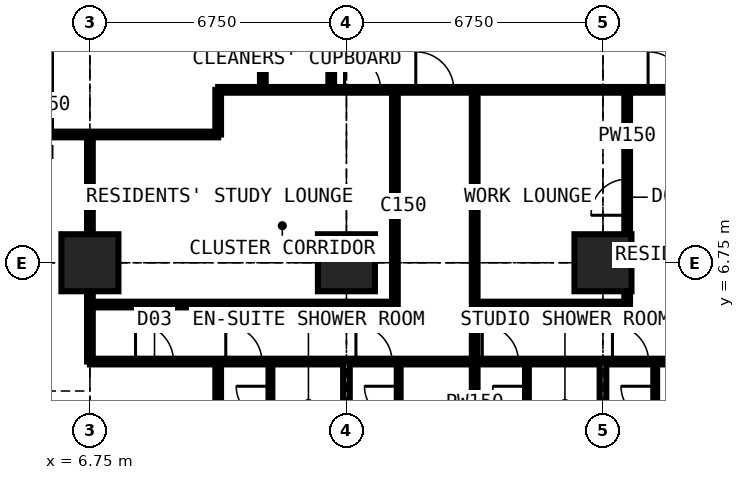
"""IFC4 building model, lengths in metres.
Left out: names, types, materials, properties, quantities, classifications, styles, units other than length and angle.
Written with IfcOpenShell. Run it as: python <this file> out.ifc"""

import sys

from ifc_helpers import new_model, si_unit, direction, frame, frame_2d, origin, origin_2d, place, context, subcontext, project, spatial, rectangle, extrude, element, fill, save


model = new_model("IFC4")
c1 = context("Model", 3, precision=1e-05, world=origin(), true_north=direction((0.0, 1.0)))
c2 = subcontext(c1, "Body", "Model", "MODEL_VIEW")
j1 = project(units=[si_unit("LENGTHUNIT", "METRE"), si_unit("PLANEANGLEUNIT", "RADIAN")], contexts=[c1])
p1 = place(None, origin())
s1 = spatial("IfcSite", under=j1, at=p1, CompositionType="ELEMENT")
p2 = place(p1, origin())
s2 = spatial("IfcBuilding", under=s1, at=p2, CompositionType="ELEMENT")
p3 = place(p2, frame((0.0, 0.0, 160.2)))
s3 = spatial("IfcBuildingStorey", under=s2, at=p3, CompositionType="ELEMENT", Elevation=160.2)
for number, where, z_axis, x_axis in (
    (1, (6.75, 6.75, 0.0), (0.0, 0.0, 1.0), (1.0, 0.0, 0.0)),
    (2, (13.5, 6.75, 0.0), (0.0, 0.0, 1.0), (1.0, 0.0, 0.0)),
    (3, (20.25, 6.75, 0.0), (0.0, 0.0, 1.0), (1.0, 0.0, 0.0)),
):
    element("IfcColumn", number, at=place(p3, frame(where, z_axis=z_axis, x_axis=x_axis)), inside=s3, PredefinedType="COLUMN", context=c2, shape_type="SweptSolid", body=[
        extrude(rectangle(XDim=1.5, YDim=1.5, at=origin_2d()), origin(), (0.0, 0.0, 1.0), 3.6),
    ])
p4 = place(p3, frame((-0.734, 10.125, 0.0), z_axis=(0.0, 0.0, 1.0), x_axis=(1.0, 0.0, 0.0)))
e4 = element("IfcWall", 4, at=p4, inside=s3, PredefinedType="PARTITIONING", context=c2, shape_type="SweptSolid", body=[
    extrude(rectangle(XDim=10.859, YDim=0.15, at=frame_2d((5.429, 0.0))), origin(), (0.0, 0.0, 1.0), 3.375),
])
p5 = place(p3, frame((6.75, 4.15, 0.0), z_axis=(0.0, 0.0, 1.0), x_axis=(0.0, 1.0, 0.0)))
e5 = element("IfcWall", 5, at=p5, inside=s3, PredefinedType="PARTITIONING", context=c2, shape_type="SweptSolid", body=[
    extrude(rectangle(XDim=5.975, YDim=0.15, at=frame_2d((2.988, 0.0))), origin(), (0.0, 0.0, 1.0), 2.877),
])
p6 = place(p3, frame((6.75, 4.15, 0.0), z_axis=(0.0, 0.0, 1.0), x_axis=(1.0, 0.0, 0.0)))
e6 = element("IfcWall", 6, at=p6, inside=s3, PredefinedType="PARTITIONING", context=c2, shape_type="SweptSolid", body=[
    extrude(rectangle(XDim=20.25, YDim=0.15, at=frame_2d((10.125, 0.0))), origin(), (0.0, 0.0, 1.0), 3.375),
])
p7 = place(p6, frame((1.2, 0.0, 0.0)))
e7 = element("IfcOpeningElement", 7, at=p7, cuts=e6, PredefinedType="OPENING", context=c2, shape_type="SweptSolid", body=[
    extrude(rectangle(XDim=1.0, YDim=2.2, at=frame_2d((0.5, 1.1))), frame((0.0, 0.085, 0.0), z_axis=(0.0, -1.0, 0.0), x_axis=(1.0, 0.0, 0.0)), (0.0, 0.0, 1.0), 0.17),
])
p8 = place(p6, frame((3.575, 0.0, 0.0)))
e8 = element("IfcOpeningElement", 8, at=p8, cuts=e6, PredefinedType="OPENING", context=c2, shape_type="SweptSolid", body=[
    extrude(rectangle(XDim=0.95, YDim=2.2, at=frame_2d((0.475, 1.1))), frame((0.0, 0.085, 0.0), z_axis=(0.0, -1.0, 0.0), x_axis=(1.0, 0.0, 0.0)), (0.0, 0.0, 1.0), 0.17),
])
p9 = place(p6, frame((7.0, 0.0, 0.0)))
e9 = element("IfcOpeningElement", 9, at=p9, cuts=e6, PredefinedType="OPENING", context=c2, shape_type="SweptSolid", body=[
    extrude(rectangle(XDim=0.95, YDim=2.2, at=frame_2d((0.475, 1.1))), frame((0.0, 0.085, 0.0), z_axis=(0.0, -1.0, 0.0), x_axis=(1.0, 0.0, 0.0)), (0.0, 0.0, 1.0), 0.17),
])
p10 = place(p6, frame((10.325, 0.0, 0.0)))
e10 = element("IfcOpeningElement", 10, at=p10, cuts=e6, PredefinedType="OPENING", context=c2, shape_type="SweptSolid", body=[
    extrude(rectangle(XDim=0.95, YDim=2.2, at=frame_2d((0.475, 1.1))), frame((0.0, 0.085, 0.0), z_axis=(0.0, -1.0, 0.0), x_axis=(1.0, 0.0, 0.0)), (0.0, 0.0, 1.0), 0.17),
])
p11 = place(p6, frame((13.75, 0.0, 0.0)))
e11 = element("IfcOpeningElement", 11, at=p11, cuts=e6, PredefinedType="OPENING", context=c2, shape_type="SweptSolid", body=[
    extrude(rectangle(XDim=0.95, YDim=2.2, at=frame_2d((0.475, 1.1))), frame((0.0, 0.085, 0.0), z_axis=(0.0, -1.0, 0.0), x_axis=(1.0, 0.0, 0.0)), (0.0, 0.0, 1.0), 0.17),
])
p12 = place(p6, frame((17.125, 0.0, 0.0)))
e12 = element("IfcOpeningElement", 12, at=p12, cuts=e6, PredefinedType="OPENING", context=c2, shape_type="SweptSolid", body=[
    extrude(rectangle(XDim=0.95, YDim=2.2, at=frame_2d((0.475, 1.1))), frame((0.0, 0.085, 0.0), z_axis=(0.0, -1.0, 0.0), x_axis=(1.0, 0.0, 0.0)), (0.0, 0.0, 1.0), 0.17),
])
p13 = place(p3, frame((6.75, 5.65, 0.0), z_axis=(0.0, 0.0, 1.0), x_axis=(1.0, 0.0, 0.0)))
e13 = element("IfcWall", 13, at=p13, inside=s3, PredefinedType="PARTITIONING", context=c2, shape_type="SweptSolid", body=[
    extrude(rectangle(XDim=8.025, YDim=0.15, at=frame_2d((4.012, 0.0))), origin(), (0.0, 0.0, 1.0), 3.375),
])
p14 = place(p3, frame((10.125, -0.734, 0.0), z_axis=(0.0, 0.0, 1.0), x_axis=(0.0, 1.0, 0.0)))
e14 = element("IfcWall", 14, at=p14, inside=s3, PredefinedType="PARTITIONING", context=c2, shape_type="SweptSolid", body=[
    extrude(rectangle(XDim=4.884, YDim=0.15, at=frame_2d((2.442, 0.0))), origin(), (0.0, 0.0, 1.0), 3.375),
])
p15 = place(p3, frame((10.125, 10.125, 0.0), z_axis=(0.0, 0.0, 1.0), x_axis=(0.0, 1.0, 0.0)))
e15 = element("IfcWall", 15, at=p15, inside=s3, PredefinedType="PARTITIONING", context=c2, shape_type="SweptSolid", body=[
    extrude(rectangle(XDim=1.175, YDim=0.15, at=frame_2d((0.587, 0.0))), origin(), (0.0, 0.0, 1.0), 3.375),
])
p16 = place(p3, frame((10.125, 11.3, 0.0), z_axis=(0.0, 0.0, 1.0), x_axis=(1.0, 0.0, 0.0)))
e16 = element("IfcWall", 16, at=p16, inside=s3, PredefinedType="PARTITIONING", context=c2, shape_type="SweptSolid", body=[
    extrude(rectangle(XDim=20.25, YDim=0.15, at=frame_2d((10.125, 0.0))), origin(), (0.0, 0.0, 1.0), 3.375),
])
p17 = place(p16, frame((5.2, 0.0, 0.0)))
e17 = element("IfcOpeningElement", 17, at=p17, cuts=e16, PredefinedType="OPENING", context=c2, shape_type="SweptSolid", body=[
    extrude(rectangle(XDim=1.0, YDim=2.2, at=frame_2d((0.5, 1.1))), frame((0.0, 0.085, 0.0), z_axis=(0.0, -1.0, 0.0), x_axis=(1.0, 0.0, 0.0)), (0.0, 0.0, 1.0), 0.17),
])
p18 = place(p16, frame((11.312, 0.0, 0.0)))
e18 = element("IfcOpeningElement", 18, at=p18, cuts=e16, PredefinedType="OPENING", context=c2, shape_type="SweptSolid", body=[
    extrude(rectangle(XDim=1.0, YDim=2.2, at=frame_2d((0.5, 1.1))), frame((0.0, 0.085, 0.0), z_axis=(0.0, -1.0, 0.0), x_axis=(1.0, 0.0, 0.0)), (0.0, 0.0, 1.0), 0.17),
])
p19 = place(p16, frame((3.325, 0.0, 0.0)))
e19 = element("IfcOpeningElement", 19, at=p19, cuts=e16, PredefinedType="OPENING", context=c2, shape_type="SweptSolid", body=[
    extrude(rectangle(XDim=0.95, YDim=2.2, at=frame_2d((0.475, 1.1))), frame((0.0, 0.085, 0.0), z_axis=(0.0, -1.0, 0.0), x_axis=(1.0, 0.0, 0.0)), (0.0, 0.0, 1.0), 0.17),
])
p20 = place(p3, frame((11.3, 11.3, 0.0), z_axis=(0.0, 0.0, 1.0), x_axis=(0.0, 1.0, 0.0)))
e20 = element("IfcWall", 20, at=p20, inside=s3, PredefinedType="PARTITIONING", context=c2, shape_type="SweptSolid", body=[
    extrude(rectangle(XDim=19.3, YDim=0.15, at=frame_2d((9.65, 0.0))), origin(), (0.0, 0.0, 1.0), 3.375),
])
p21 = place(p20, frame((18.1, 0.0, 0.0)))
e21 = element("IfcOpeningElement", 21, at=p21, cuts=e20, PredefinedType="OPENING", context=c2, shape_type="SweptSolid", body=[
    extrude(rectangle(XDim=1.0, YDim=2.2, at=frame_2d((0.5, 1.1))), frame((0.0, 0.085, 0.0), z_axis=(0.0, -1.0, 0.0), x_axis=(1.0, 0.0, 0.0)), (0.0, 0.0, 1.0), 0.17),
])
p22 = place(p20, frame((10.137, 0.0, 0.0)))
e22 = element("IfcOpeningElement", 22, at=p22, cuts=e20, PredefinedType="OPENING", context=c2, shape_type="SweptSolid", body=[
    extrude(rectangle(XDim=1.0, YDim=2.2, at=frame_2d((0.5, 1.1))), frame((0.0, 0.085, 0.0), z_axis=(0.0, -1.0, 0.0), x_axis=(1.0, 0.0, 0.0)), (0.0, 0.0, 1.0), 0.17),
])
p23 = place(p3, frame((11.5, 1.95, 0.0), z_axis=(0.0, 0.0, 1.0), x_axis=(0.0, 1.0, 0.0)))
e23 = element("IfcWall", 23, at=p23, inside=s3, PredefinedType="PARTITIONING", context=c2, shape_type="SweptSolid", body=[
    extrude(rectangle(XDim=2.2, YDim=0.1, at=frame_2d((1.1, 0.0))), origin(), (0.0, 0.0, 1.0), 3.375),
])
p24 = place(p23, frame((0.65, 0.0, 0.0)))
e24 = element("IfcOpeningElement", 24, at=p24, cuts=e23, PredefinedType="OPENING", context=c2, shape_type="SweptSolid", body=[
    extrude(rectangle(XDim=0.9, YDim=2.2, at=frame_2d((0.45, 1.1))), frame((0.0, 0.06, 0.0), z_axis=(0.0, -1.0, 0.0), x_axis=(1.0, 0.0, 0.0)), (0.0, 0.0, 1.0), 0.12),
])
p25 = place(p3, frame((13.1, 11.3, 0.0), z_axis=(0.0, 0.0, 1.0), x_axis=(0.0, 1.0, 0.0)))
e25 = element("IfcWall", 25, at=p25, inside=s3, PredefinedType="PARTITIONING", context=c2, shape_type="SweptSolid", body=[
    extrude(rectangle(XDim=1.6, YDim=0.15, at=frame_2d((0.8, 0.0))), origin(), (0.0, 0.0, 1.0), 3.375),
])
p26 = place(p3, frame((13.5, -0.734, 0.0), z_axis=(0.0, 0.0, 1.0), x_axis=(0.0, 1.0, 0.0)))
e26 = element("IfcWall", 26, at=p26, inside=s3, PredefinedType="PARTITIONING", context=c2, shape_type="SweptSolid", body=[
    extrude(rectangle(XDim=4.884, YDim=0.175, at=frame_2d((2.442, 0.0))), origin(), (0.0, 0.0, 1.0), 2.61),
])
p27 = place(p3, frame((14.775, 5.65, 0.0), z_axis=(0.0, 0.0, 1.0), x_axis=(0.0, 1.0, 0.0)))
e27 = element("IfcWall", 27, at=p27, inside=s3, PredefinedType="PARTITIONING", context=c2, shape_type="SweptSolid", body=[
    extrude(rectangle(XDim=5.65, YDim=0.15, at=frame_2d((2.825, 0.0))), origin(), (0.0, 0.0, 1.0), 3.375),
])
p28 = place(p3, frame((14.875, 1.95, 0.0), z_axis=(0.0, 0.0, 1.0), x_axis=(0.0, 1.0, 0.0)))
e28 = element("IfcWall", 28, at=p28, inside=s3, PredefinedType="PARTITIONING", context=c2, shape_type="SweptSolid", body=[
    extrude(rectangle(XDim=2.2, YDim=0.1, at=frame_2d((1.1, 0.0))), origin(), (0.0, 0.0, 1.0), 3.375),
])
p29 = place(p28, frame((0.65, 0.0, 0.0)))
e29 = element("IfcOpeningElement", 29, at=p29, cuts=e28, PredefinedType="OPENING", context=c2, shape_type="SweptSolid", body=[
    extrude(rectangle(XDim=0.9, YDim=2.2, at=frame_2d((0.45, 1.1))), frame((0.0, 0.06, 0.0), z_axis=(0.0, -1.0, 0.0), x_axis=(1.0, 0.0, 0.0)), (0.0, 0.0, 1.0), 0.12),
])
p30 = place(p3, frame((16.875, -0.734, 0.0), z_axis=(0.0, 0.0, 1.0), x_axis=(0.0, 1.0, 0.0)))
e30 = element("IfcWall", 30, at=p30, inside=s3, PredefinedType="PARTITIONING", context=c2, shape_type="SweptSolid", body=[
    extrude(rectangle(XDim=12.034, YDim=0.15, at=frame_2d((6.017, 0.0))), origin(), (0.0, 0.0, 1.0), 3.375),
])
p31 = place(p3, frame((16.875, 5.65, 0.0), z_axis=(0.0, 0.0, 1.0), x_axis=(1.0, 0.0, 0.0)))
e31 = element("IfcWall", 31, at=p31, inside=s3, PredefinedType="PARTITIONING", context=c2, shape_type="SweptSolid", body=[
    extrude(rectangle(XDim=4.012, YDim=0.15, at=frame_2d((2.006, 0.0))), origin(), (0.0, 0.0, 1.0), 3.375),
])
p32 = place(p3, frame((18.25, 1.95, 0.0), z_axis=(0.0, 0.0, 1.0), x_axis=(0.0, 1.0, 0.0)))
e32 = element("IfcWall", 32, at=p32, inside=s3, PredefinedType="PARTITIONING", context=c2, shape_type="SweptSolid", body=[
    extrude(rectangle(XDim=2.2, YDim=0.1, at=frame_2d((1.1, 0.0))), origin(), (0.0, 0.0, 1.0), 3.375),
])
p33 = place(p32, frame((0.65, 0.0, 0.0)))
e33 = element("IfcOpeningElement", 33, at=p33, cuts=e32, PredefinedType="OPENING", context=c2, shape_type="SweptSolid", body=[
    extrude(rectangle(XDim=0.9, YDim=2.2, at=frame_2d((0.45, 1.1))), frame((0.0, 0.06, 0.0), z_axis=(0.0, -1.0, 0.0), x_axis=(1.0, 0.0, 0.0)), (0.0, 0.0, 1.0), 0.12),
])
p34 = place(p3, frame((20.25, -0.734, 0.0), z_axis=(0.0, 0.0, 1.0), x_axis=(0.0, 1.0, 0.0)))
e34 = element("IfcWall", 34, at=p34, inside=s3, PredefinedType="PARTITIONING", context=c2, shape_type="SweptSolid", body=[
    extrude(rectangle(XDim=4.884, YDim=0.175, at=frame_2d((2.442, 0.0))), origin(), (0.0, 0.0, 1.0), 2.61),
])
p35 = place(p3, frame((20.887, 5.65, 0.0), z_axis=(0.0, 0.0, 1.0), x_axis=(0.0, 1.0, 0.0)))
e35 = element("IfcWall", 35, at=p35, inside=s3, PredefinedType="PARTITIONING", context=c2, shape_type="SweptSolid", body=[
    extrude(rectangle(XDim=5.65, YDim=0.15, at=frame_2d((2.825, 0.0))), origin(), (0.0, 0.0, 1.0), 3.375),
])
p36 = place(p35, frame((2.35, 0.0, 0.0)))
e36 = element("IfcOpeningElement", 36, at=p36, cuts=e35, PredefinedType="OPENING", context=c2, shape_type="SweptSolid", body=[
    extrude(rectangle(XDim=0.95, YDim=2.2, at=frame_2d((0.475, 1.1))), frame((0.0, 0.085, 0.0), z_axis=(0.0, -1.0, 0.0), x_axis=(1.0, 0.0, 0.0)), (0.0, 0.0, 1.0), 0.17),
])
p37 = place(p3, frame((21.625, 1.95, 0.0), z_axis=(0.0, 0.0, 1.0), x_axis=(0.0, 1.0, 0.0)))
e37 = element("IfcWall", 37, at=p37, inside=s3, PredefinedType="PARTITIONING", context=c2, shape_type="SweptSolid", body=[
    extrude(rectangle(XDim=2.2, YDim=0.1, at=frame_2d((1.1, 0.0))), origin(), (0.0, 0.0, 1.0), 3.375),
])
p38 = place(p37, frame((0.65, 0.0, 0.0)))
e38 = element("IfcOpeningElement", 38, at=p38, cuts=e37, PredefinedType="OPENING", context=c2, shape_type="SweptSolid", body=[
    extrude(rectangle(XDim=0.9, YDim=2.2, at=frame_2d((0.45, 1.1))), frame((0.0, 0.06, 0.0), z_axis=(0.0, -1.0, 0.0), x_axis=(1.0, 0.0, 0.0)), (0.0, 0.0, 1.0), 0.12),
])
p39 = place(p7, origin())
e39 = element("IfcDoor", 39, at=p39, inside=s3, OperationType="SINGLE_SWING_LEFT", PredefinedType="DOOR", context=c2, shape_type="SweptSolid", body=[
    extrude(rectangle(XDim=1.0, YDim=2.2, at=frame_2d((0.5, 1.1))), frame((0.0, 0.025, 0.0), z_axis=(0.0, -1.0, 0.0), x_axis=(1.0, 0.0, 0.0)), (0.0, 0.0, 1.0), 0.05),
])
fill(e7, e39)
p40 = place(p8, origin())
e40 = element("IfcDoor", 40, at=p40, inside=s3, OperationType="SINGLE_SWING_LEFT", PredefinedType="DOOR", context=c2, shape_type="SweptSolid", body=[
    extrude(rectangle(XDim=0.95, YDim=2.2, at=frame_2d((0.475, 1.1))), frame((0.0, 0.025, 0.0), z_axis=(0.0, -1.0, 0.0), x_axis=(1.0, 0.0, 0.0)), (0.0, 0.0, 1.0), 0.05),
])
fill(e8, e40)
p41 = place(p24, origin())
e41 = element("IfcDoor", 41, at=p41, inside=s3, OperationType="SINGLE_SWING_RIGHT", PredefinedType="DOOR", context=c2, shape_type="SweptSolid", body=[
    extrude(rectangle(XDim=0.9, YDim=2.2, at=frame_2d((0.45, 1.1))), frame((0.0, 0.025, 0.0), z_axis=(0.0, -1.0, 0.0), x_axis=(1.0, 0.0, 0.0)), (0.0, 0.0, 1.0), 0.05),
])
fill(e24, e41)
p42 = place(p9, origin())
e42 = element("IfcDoor", 42, at=p42, inside=s3, OperationType="SINGLE_SWING_LEFT", PredefinedType="DOOR", context=c2, shape_type="SweptSolid", body=[
    extrude(rectangle(XDim=0.95, YDim=2.2, at=frame_2d((0.475, 1.1))), frame((0.0, 0.025, 0.0), z_axis=(0.0, -1.0, 0.0), x_axis=(1.0, 0.0, 0.0)), (0.0, 0.0, 1.0), 0.05),
])
fill(e9, e42)
p43 = place(p29, origin())
e43 = element("IfcDoor", 43, at=p43, inside=s3, OperationType="SINGLE_SWING_RIGHT", PredefinedType="DOOR", context=c2, shape_type="SweptSolid", body=[
    extrude(rectangle(XDim=0.9, YDim=2.2, at=frame_2d((0.45, 1.1))), frame((0.0, 0.025, 0.0), z_axis=(0.0, -1.0, 0.0), x_axis=(1.0, 0.0, 0.0)), (0.0, 0.0, 1.0), 0.05),
])
fill(e29, e43)
p44 = place(p17, origin())
e44 = element("IfcDoor", 44, at=p44, inside=s3, OperationType="SINGLE_SWING_LEFT", PredefinedType="DOOR", context=c2, shape_type="SweptSolid", body=[
    extrude(rectangle(XDim=1.0, YDim=2.2, at=frame_2d((0.5, 1.1))), frame((0.0, 0.025, 0.0), z_axis=(0.0, -1.0, 0.0), x_axis=(1.0, 0.0, 0.0)), (0.0, 0.0, 1.0), 0.05),
])
fill(e17, e44)
p45 = place(p10, origin())
e45 = element("IfcDoor", 45, at=p45, inside=s3, OperationType="SINGLE_SWING_LEFT", PredefinedType="DOOR", context=c2, shape_type="SweptSolid", body=[
    extrude(rectangle(XDim=0.95, YDim=2.2, at=frame_2d((0.475, 1.1))), frame((0.0, 0.025, 0.0), z_axis=(0.0, -1.0, 0.0), x_axis=(1.0, 0.0, 0.0)), (0.0, 0.0, 1.0), 0.05),
])
fill(e10, e45)
p46 = place(p33, origin())
e46 = element("IfcDoor", 46, at=p46, inside=s3, OperationType="SINGLE_SWING_RIGHT", PredefinedType="DOOR", context=c2, shape_type="SweptSolid", body=[
    extrude(rectangle(XDim=0.9, YDim=2.2, at=frame_2d((0.45, 1.1))), frame((0.0, 0.025, 0.0), z_axis=(0.0, -1.0, 0.0), x_axis=(1.0, 0.0, 0.0)), (0.0, 0.0, 1.0), 0.05),
])
fill(e33, e46)
p47 = place(p11, origin())
e47 = element("IfcDoor", 47, at=p47, inside=s3, OperationType="SINGLE_SWING_LEFT", PredefinedType="DOOR", context=c2, shape_type="SweptSolid", body=[
    extrude(rectangle(XDim=0.95, YDim=2.2, at=frame_2d((0.475, 1.1))), frame((0.0, 0.025, 0.0), z_axis=(0.0, -1.0, 0.0), x_axis=(1.0, 0.0, 0.0)), (0.0, 0.0, 1.0), 0.05),
])
fill(e11, e47)
p48 = place(p38, origin())
e48 = element("IfcDoor", 48, at=p48, inside=s3, OperationType="SINGLE_SWING_RIGHT", PredefinedType="DOOR", context=c2, shape_type="SweptSolid", body=[
    extrude(rectangle(XDim=0.9, YDim=2.2, at=frame_2d((0.45, 1.1))), frame((0.0, 0.025, 0.0), z_axis=(0.0, -1.0, 0.0), x_axis=(1.0, 0.0, 0.0)), (0.0, 0.0, 1.0), 0.05),
])
fill(e38, e48)
p49 = place(p18, origin())
e49 = element("IfcDoor", 49, at=p49, inside=s3, OperationType="SINGLE_SWING_LEFT", PredefinedType="DOOR", context=c2, shape_type="SweptSolid", body=[
    extrude(rectangle(XDim=1.0, YDim=2.2, at=frame_2d((0.5, 1.1))), frame((0.0, 0.025, 0.0), z_axis=(0.0, -1.0, 0.0), x_axis=(1.0, 0.0, 0.0)), (0.0, 0.0, 1.0), 0.05),
])
fill(e18, e49)
p50 = place(p19, origin())
e50 = element("IfcDoor", 50, at=p50, inside=s3, OperationType="SINGLE_SWING_LEFT", PredefinedType="DOOR", context=c2, shape_type="SweptSolid", body=[
    extrude(rectangle(XDim=0.95, YDim=2.2, at=frame_2d((0.475, 1.1))), frame((0.0, 0.025, 0.0), z_axis=(0.0, -1.0, 0.0), x_axis=(1.0, 0.0, 0.0)), (0.0, 0.0, 1.0), 0.05),
])
fill(e19, e50)
p51 = place(p36, origin())
e51 = element("IfcDoor", 51, at=p51, inside=s3, OperationType="SINGLE_SWING_LEFT", PredefinedType="DOOR", context=c2, shape_type="SweptSolid", body=[
    extrude(rectangle(XDim=0.95, YDim=2.2, at=frame_2d((0.475, 1.1))), frame((0.0, 0.025, 0.0), z_axis=(0.0, -1.0, 0.0), x_axis=(1.0, 0.0, 0.0)), (0.0, 0.0, 1.0), 0.05),
])
fill(e36, e51)
save(model, sys.argv[1])
